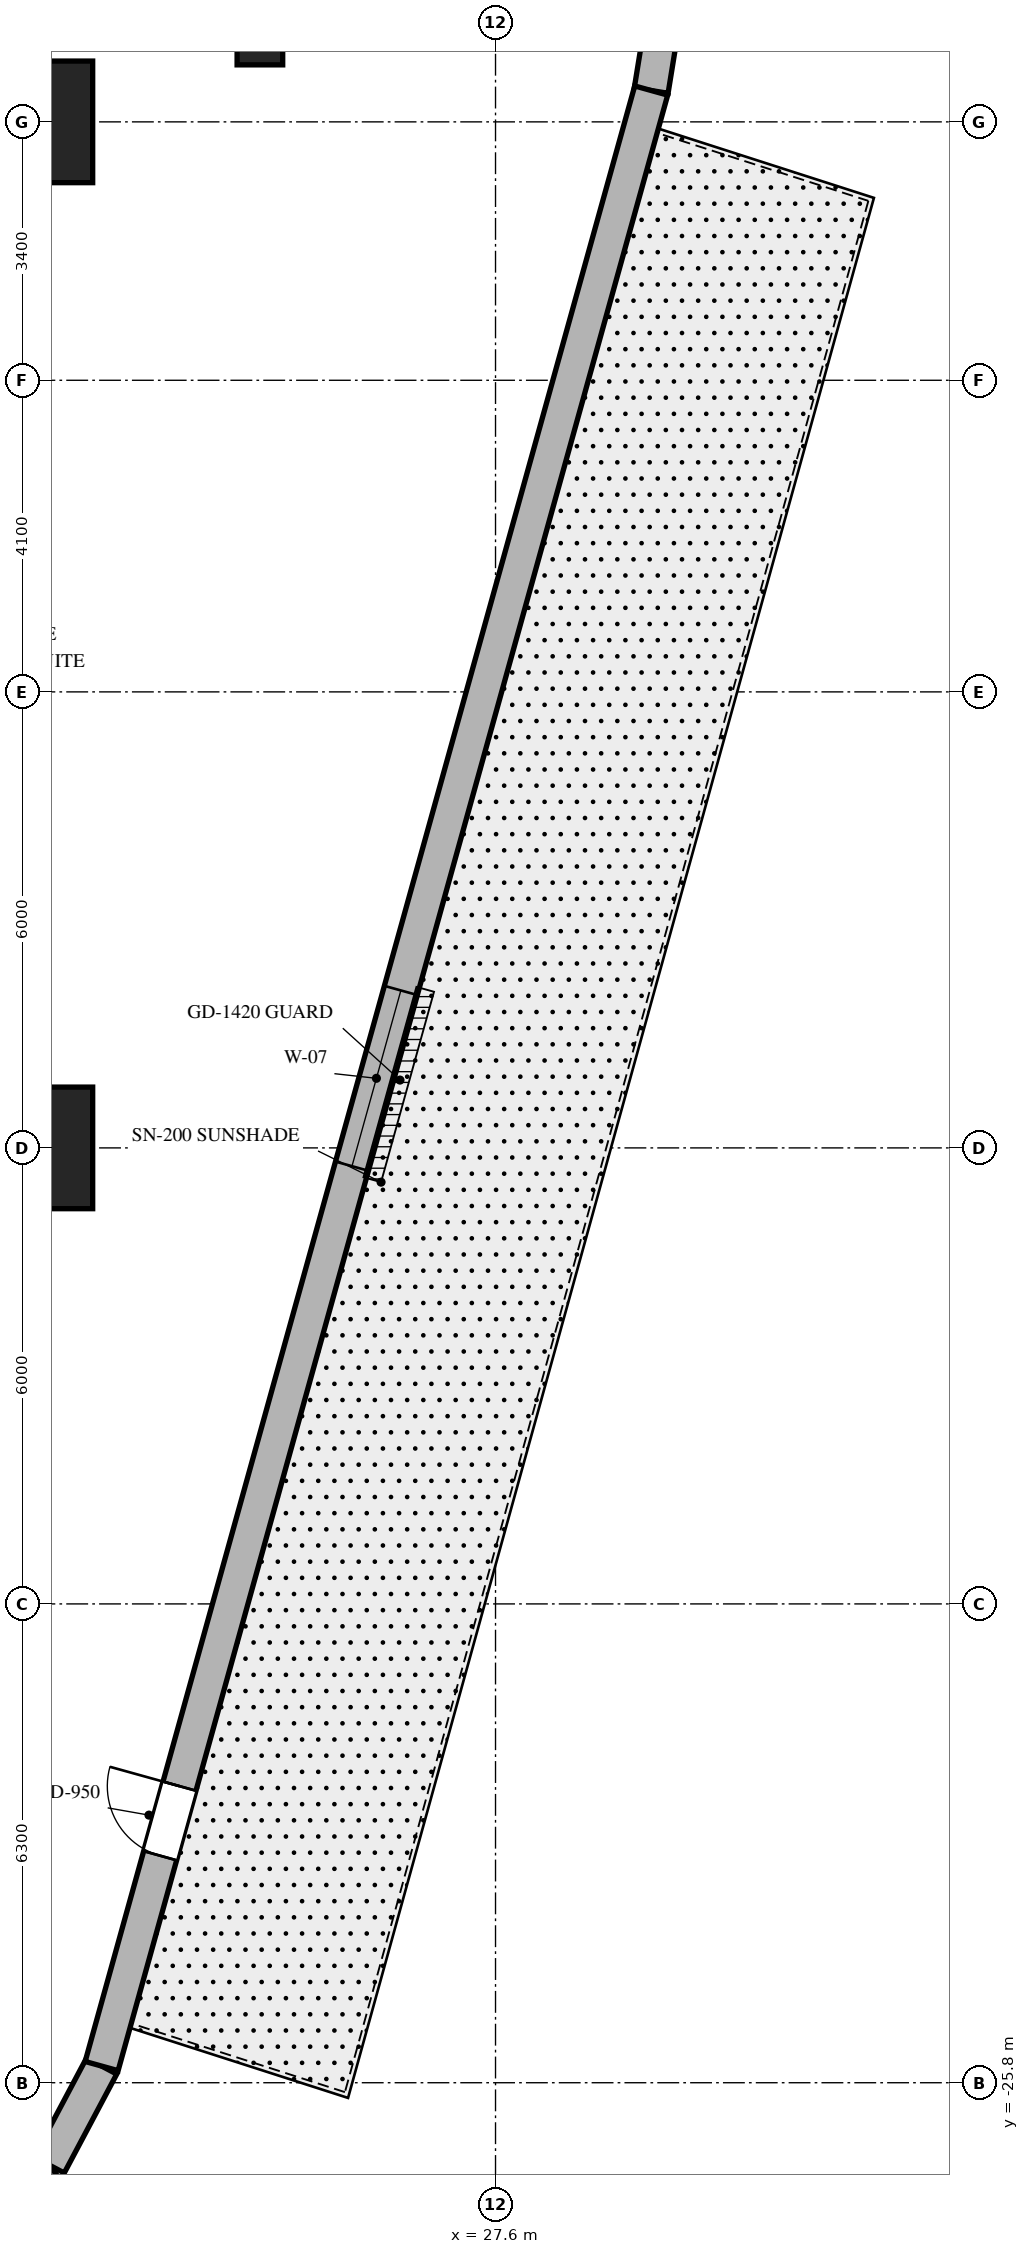
"""IFC4 building model, lengths in metres.
Left out: names, types, materials, properties, quantities, classifications, styles, units other than length and angle.
Written with IfcOpenShell. Run it as: python <this file> out.ifc"""

import sys

from ifc_helpers import new_model, si_unit, direction, frame, frame_2d, origin, origin_2d, place, context, subcontext, project, spatial, rectangle, extrude, element, fill, save


model = new_model("IFC4")
c1 = context("Model", 3, precision=1e-05, world=origin(), true_north=direction((0.0, 1.0)))
c2 = subcontext(c1, "Body", "Model", "MODEL_VIEW")
j1 = project(units=[si_unit("LENGTHUNIT", "METRE"), si_unit("PLANEANGLEUNIT", "RADIAN")], contexts=[c1])
p1 = place(None, origin())
s1 = spatial("IfcSite", under=j1, at=p1, CompositionType="ELEMENT")
p2 = place(p1, origin())
s2 = spatial("IfcBuilding", under=s1, at=p2, CompositionType="ELEMENT")
p3 = place(p2, frame((0.0, 0.0, 11.4)))
s3 = spatial("IfcBuildingStorey", under=s2, at=p3, CompositionType="ELEMENT", Elevation=11.4)
for number, where, z_axis, x_axis in (
    (1, (21.5, -13.5, 0.0), (0.0, 0.0, 1.0), (1.0, 0.0, 0.0)),
    (2, (21.5, 0.0, 0.0), (0.0, 0.0, 1.0), (1.0, 0.0, 0.0)),
):
    element("IfcColumn", number, at=place(p3, frame(where, z_axis=z_axis, x_axis=x_axis)), inside=s3, PredefinedType="COLUMN", context=c2, shape_type="SweptSolid", body=[
        extrude(rectangle(XDim=1.6, YDim=1.6, at=origin_2d()), origin(), (0.0, 0.0, 1.0), 7.2),
    ])
p4 = place(p3, frame((24.5, 1.2, 0.0), z_axis=(0.0, 0.0, 1.0), x_axis=(1.0, 0.0, 0.0)))
e3 = element("IfcColumn", 3, at=p4, inside=s3, PredefinedType="PILASTER", context=c2, shape_type="SweptSolid", body=[
    extrude(rectangle(XDim=0.6, YDim=0.9, at=origin_2d()), origin(), (0.0, 0.0, 1.0), 7.2),
])
p5 = place(p3, frame((20.574, -27.758, 0.0), z_axis=(0.0, 0.0, 1.0), x_axis=(0.796282384807, 0.604925089284, 0.0)))
e4 = element("IfcWall", 4, at=p5, inside=s3, PredefinedType="SOLIDWALL", context=c2, shape_type="SweptSolid", body=[
    extrude(rectangle(XDim=1.448, YDim=0.45, at=frame_2d((0.724, 0.0))), origin(), (0.0, 0.0, 1.0), 6.88),
])
p6 = place(p3, frame((21.727, -26.882, 0.0), z_axis=(0.0, 0.0, 1.0), x_axis=(0.468626083389, 0.883396623249, 0.0)))
e5 = element("IfcWall", 5, at=p6, inside=s3, PredefinedType="SOLIDWALL", context=c2, shape_type="SweptSolid", body=[
    extrude(rectangle(XDim=1.473, YDim=0.45, at=frame_2d((0.737, 0.0))), origin(), (0.0, 0.0, 1.0), 6.88),
])
p7 = place(p3, frame((29.648, 0.412, 0.0), z_axis=(0.0, 0.0, 1.0), x_axis=(0.160207253195, 0.987083398718, 0.0)))
e6 = element("IfcWall", 6, at=p7, inside=s3, PredefinedType="SOLIDWALL", context=c2, shape_type="SweptSolid", body=[
    extrude(rectangle(XDim=0.756, YDim=0.45, at=frame_2d((0.378, 0.0))), origin(), (0.0, 0.0, 1.0), 6.88),
])
p8 = place(p3, frame((22.418, -25.581, 0.0), z_axis=(0.0, 0.0, 1.0), x_axis=(0.26799294283, 0.963420875108, 0.0)))
e7 = element("IfcWall", 7, at=p8, inside=s3, PredefinedType="SOLIDWALL", context=c2, shape_type="SweptSolid", body=[
    extrude(rectangle(XDim=26.98, YDim=0.45, at=frame_2d((13.49, 0.0))), origin(), (0.0, 0.0, 1.0), 6.88),
])
p9 = place(p8, frame((2.873, 0.0, 0.0)))
e8 = element("IfcOpeningElement", 8, at=p9, cuts=e7, PredefinedType="OPENING", context=c2, shape_type="SweptSolid", body=[
    extrude(rectangle(XDim=0.95, YDim=2.15, at=frame_2d((0.475, 1.075))), frame((0.0, 0.235, 0.0), z_axis=(0.0, -1.0, 0.0), x_axis=(1.0, 0.0, 0.0)), (0.0, 0.0, 1.0), 0.47),
])
p10 = place(p8, frame((12.29, 0.0, 0.85)))
e9 = element("IfcOpeningElement", 9, at=p10, cuts=e7, PredefinedType="OPENING", context=c2, shape_type="SweptSolid", body=[
    extrude(rectangle(XDim=2.4, YDim=2.4, at=frame_2d((1.2, 1.2))), frame((0.0, 0.235, 0.0), z_axis=(0.0, -1.0, 0.0), x_axis=(1.0, 0.0, 0.0)), (0.0, 0.0, 1.0), 0.47),
])
p11 = place(p9, origin())
e10 = element("IfcDoor", 10, at=p11, inside=s3, OperationType="SINGLE_SWING_RIGHT", PredefinedType="DOOR", context=c2, shape_type="SweptSolid", body=[
    extrude(rectangle(XDim=0.95, YDim=2.15, at=frame_2d((0.475, 1.075))), frame((0.0, 0.025, 0.0), z_axis=(0.0, -1.0, 0.0), x_axis=(1.0, 0.0, 0.0)), (0.0, 0.0, 1.0), 0.05),
])
fill(e8, e10)
p12 = place(p10, origin())
e11 = element("IfcWindow", 11, at=p12, inside=s3, PartitioningType="SINGLE_PANEL", PredefinedType="WINDOW", context=c2, shape_type="SweptSolid", body=[
    extrude(rectangle(XDim=2.4, YDim=2.4, at=frame_2d((1.2, 1.2))), frame((0.0, 0.03, 0.0), z_axis=(0.0, -1.0, 0.0), x_axis=(1.0, 0.0, 0.0)), (0.0, 0.0, 1.0), 0.06),
])
fill(e9, e11)
save(model, sys.argv[1])
